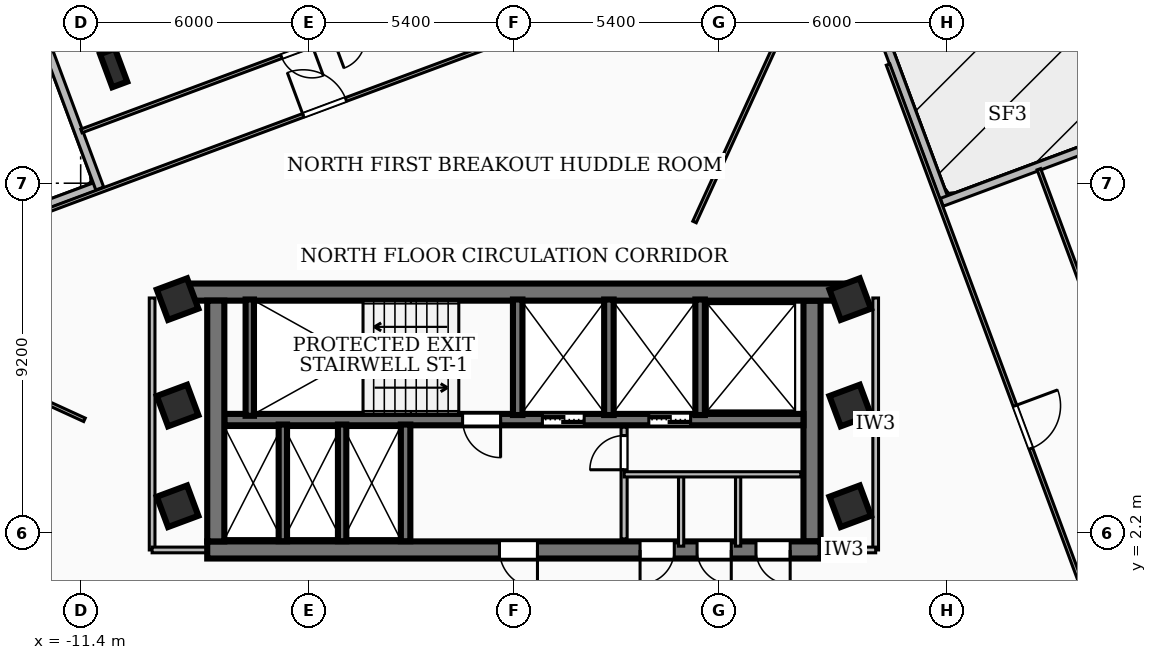
"""IFC4 building model, lengths in metres.
Left out: names, types, materials, properties, quantities, classifications, styles, units other than length and angle.
Written with IfcOpenShell. Run it as: python <this file> out.ifc"""

import sys

from ifc_helpers import new_model, si_unit, direction, frame, frame_2d, origin, origin_2d, place, context, subcontext, project, spatial, rectangle, i_section, extrude, element, fill, save


model = new_model("IFC4")
c1 = context("Model", 3, precision=1e-05, world=origin(), true_north=direction((0.0, 1.0)))
c2 = subcontext(c1, "Body", "Model", "MODEL_VIEW")
j1 = project(units=[si_unit("LENGTHUNIT", "METRE"), si_unit("PLANEANGLEUNIT", "RADIAN")], contexts=[c1])
p1 = place(None, origin())
s1 = spatial("IfcSite", under=j1, at=p1, CompositionType="ELEMENT")
p2 = place(p1, origin())
s2 = spatial("IfcBuilding", under=s1, at=p2, CompositionType="ELEMENT")
p3 = place(p2, frame((0.0, 0.0, 166.68)))
s3 = spatial("IfcBuildingStorey", under=s2, at=p3, CompositionType="ELEMENT", Elevation=166.68)
p4 = place(p3, frame((-8.78, 8.535, 0.0), z_axis=(0.0, 0.0, 1.0), x_axis=(1.0, 0.0, 0.0)))
e1 = element("IfcWall", 1, at=p4, inside=s3, PredefinedType="SHEAR", context=c2, shape_type="SweptSolid", body=[
    extrude(rectangle(XDim=17.56, YDim=0.45, at=frame_2d((8.78, 0.0))), origin(), (0.0, 0.0, 1.0), 3.34),
])
p5 = place(p3, frame((8.07, 1.75, 0.0), z_axis=(0.0, 0.0, 1.0), x_axis=(-1.0, 0.0, 0.0)))
e2 = element("IfcWall", 2, at=p5, inside=s3, PredefinedType="SHEAR", context=c2, shape_type="SweptSolid", body=[
    extrude(rectangle(XDim=16.14, YDim=0.45, at=frame_2d((8.07, 0.0))), origin(), (0.0, 0.0, 1.0), 3.34),
])
p6 = place(p5, frame((7.45, 0.0, 0.0)))
e3 = element("IfcOpeningElement", 3, at=p6, cuts=e2, PredefinedType="OPENING", context=c2, shape_type="SweptSolid", body=[
    extrude(rectangle(XDim=1.0, YDim=2.1, at=frame_2d((0.5, 1.05))), frame((0.0, 0.235, 0.0), z_axis=(0.0, -1.0, 0.0), x_axis=(1.0, 0.0, 0.0)), (0.0, 0.0, 1.0), 0.47),
])
p7 = place(p5, frame((3.85, 0.0, 0.0)))
e4 = element("IfcOpeningElement", 4, at=p7, cuts=e2, PredefinedType="OPENING", context=c2, shape_type="SweptSolid", body=[
    extrude(rectangle(XDim=0.9, YDim=2.06, at=frame_2d((0.45, 1.03))), frame((0.0, 0.235, 0.0), z_axis=(0.0, -1.0, 0.0), x_axis=(1.0, 0.0, 0.0)), (0.0, 0.0, 1.0), 0.47),
])
p8 = place(p5, frame((2.35, 0.0, 0.0)))
e5 = element("IfcOpeningElement", 5, at=p8, cuts=e2, PredefinedType="OPENING", context=c2, shape_type="SweptSolid", body=[
    extrude(rectangle(XDim=0.9, YDim=2.06, at=frame_2d((0.45, 1.03))), frame((0.0, 0.235, 0.0), z_axis=(0.0, -1.0, 0.0), x_axis=(1.0, 0.0, 0.0)), (0.0, 0.0, 1.0), 0.47),
])
p9 = place(p5, frame((0.8, 0.0, 0.0)))
e6 = element("IfcOpeningElement", 6, at=p9, cuts=e2, PredefinedType="OPENING", context=c2, shape_type="SweptSolid", body=[
    extrude(rectangle(XDim=0.9, YDim=2.06, at=frame_2d((0.45, 1.03))), frame((0.0, 0.235, 0.0), z_axis=(0.0, -1.0, 0.0), x_axis=(1.0, 0.0, 0.0)), (0.0, 0.0, 1.0), 0.47),
])
for number, where, z_axis, x_axis in (
    (7, (-7.845, 1.975, 0.0), (0.0, 0.0, 1.0), (0.0, 1.0, 0.0)),
    (8, (7.845, 8.31, 0.0), (0.0, 0.0, 1.0), (0.0, -1.0, 0.0)),
):
    element("IfcWall", number, at=place(p3, frame(where, z_axis=z_axis, x_axis=x_axis)), inside=s3, PredefinedType="SHEAR", context=c2, shape_type="SweptSolid", body=[
        extrude(rectangle(XDim=6.335, YDim=0.45, at=frame_2d((3.167, 0.0))), origin(), (0.0, 0.0, 1.0), 3.34),
    ])
p10 = place(p3, frame((7.62, 5.18, 0.0), z_axis=(0.0, 0.0, 1.0), x_axis=(-1.0, 0.0, 0.0)))
e9 = element("IfcWall", 9, at=p10, inside=s3, PredefinedType="SOLIDWALL", context=c2, shape_type="SweptSolid", body=[
    extrude(rectangle(XDim=15.24, YDim=0.3, at=frame_2d((7.62, 0.0))), origin(), (0.0, 0.0, 1.0), 3.34),
])
p11 = place(p10, frame((5.77, 0.0, 0.0)))
e10 = element("IfcOpeningElement", 10, at=p11, cuts=e9, PredefinedType="OPENING", context=c2, shape_type="SweptSolid", body=[
    extrude(rectangle(XDim=1.1, YDim=2.15, at=frame_2d((0.55, 1.075))), frame((0.0, 0.16, 0.0), z_axis=(0.0, -1.0, 0.0), x_axis=(1.0, 0.0, 0.0)), (0.0, 0.0, 1.0), 0.32),
])
p12 = place(p10, frame((2.97, 0.0, 0.0)))
e11 = element("IfcOpeningElement", 11, at=p12, cuts=e9, PredefinedType="OPENING", context=c2, shape_type="SweptSolid", body=[
    extrude(rectangle(XDim=1.1, YDim=2.15, at=frame_2d((0.55, 1.075))), frame((0.0, 0.16, 0.0), z_axis=(0.0, -1.0, 0.0), x_axis=(1.0, 0.0, 0.0)), (0.0, 0.0, 1.0), 0.32),
])
p13 = place(p10, frame((7.97, 0.0, 0.0)))
e12 = element("IfcOpeningElement", 12, at=p13, cuts=e9, PredefinedType="OPENING", context=c2, shape_type="SweptSolid", body=[
    extrude(rectangle(XDim=1.0, YDim=2.1, at=frame_2d((0.5, 1.05))), frame((0.0, 0.16, 0.0), z_axis=(0.0, -1.0, 0.0), x_axis=(1.0, 0.0, 0.0)), (0.0, 0.0, 1.0), 0.32),
])
p14 = place(p3, frame((-6.95, 5.28, 0.0), z_axis=(0.0, 0.0, 1.0), x_axis=(0.0, 1.0, 0.0)))
e13 = element("IfcWall", 13, at=p14, inside=s3, PredefinedType="SOLIDWALL", context=c2, shape_type="SweptSolid", body=[
    extrude(rectangle(XDim=3.06, YDim=0.22, at=frame_2d((1.53, 0.0))), origin(), (0.0, 0.0, 1.0), 3.34),
])
for number, where, z_axis, x_axis in (
    (14, (0.1, 5.3, 0.0), (0.0, 0.0, 1.0), (0.0, 1.0, 0.0)),
    (15, (2.5, 5.3, 0.0), (0.0, 0.0, 1.0), (0.0, 1.0, 0.0)),
    (16, (4.9, 5.3, 0.0), (0.0, 0.0, 1.0), (0.0, 1.0, 0.0)),
):
    element("IfcWall", number, at=place(p3, frame(where, z_axis=z_axis, x_axis=x_axis)), inside=s3, PredefinedType="SOLIDWALL", context=c2, shape_type="SweptSolid", body=[
        extrude(rectangle(XDim=3.04, YDim=0.25, at=frame_2d((1.52, 0.0))), origin(), (0.0, 0.0, 1.0), 3.34),
    ])
p15 = place(p3, frame((-2.85, 1.98, 0.0), z_axis=(0.0, 0.0, 1.0), x_axis=(0.0, 1.0, 0.0)))
e17 = element("IfcWall", 17, at=p15, inside=s3, PredefinedType="SOLIDWALL", context=c2, shape_type="SweptSolid", body=[
    extrude(rectangle(XDim=3.07, YDim=0.25, at=frame_2d((1.535, 0.0))), origin(), (0.0, 0.0, 1.0), 3.34),
])
for number, where, z_axis, x_axis in (
    (18, (-6.08, 1.98, 0.0), (0.0, 0.0, 1.0), (0.0, 1.0, 0.0)),
    (19, (-4.52, 1.98, 0.0), (0.0, 0.0, 1.0), (0.0, 1.0, 0.0)),
):
    element("IfcWall", number, at=place(p3, frame(where, z_axis=z_axis, x_axis=x_axis)), inside=s3, PredefinedType="SOLIDWALL", context=c2, shape_type="SweptSolid", body=[
        extrude(rectangle(XDim=3.07, YDim=0.22, at=frame_2d((1.535, 0.0))), origin(), (0.0, 0.0, 1.0), 3.34),
    ])
for number, where, z_axis, x_axis in (
    (20, (-8.85, 2.9, 0.0), (0.0, 0.0, 1.0), (0.937, 0.349, 0.0)),
    (21, (-8.85, 5.55, 0.0), (0.0, 0.0, 1.0), (0.937, 0.349, 0.0)),
    (22, (8.85, 2.9, 0.0), (0.0, 0.0, 1.0), (0.937, 0.349, 0.0)),
    (23, (8.85, 5.55, 0.0), (0.0, 0.0, 1.0), (0.937, 0.349, 0.0)),
    (24, (-8.85, 8.35, 0.0), (0.0, 0.0, 1.0), (0.937, 0.349, 0.0)),
    (25, (8.85, 8.35, 0.0), (0.0, 0.0, 1.0), (0.937, 0.349, 0.0)),
):
    element("IfcColumn", number, at=place(p3, frame(where, z_axis=z_axis, x_axis=x_axis)), inside=s3, PredefinedType="COLUMN", context=c2, shape_type="SweptSolid", body=[
        extrude(rectangle(XDim=0.85, YDim=0.85, at=origin_2d()), origin(), (0.0, 0.0, 1.0), 3.6),
    ])
p16 = place(p3, frame((-10.533, 14.433, 0.0), z_axis=(0.0, 0.0, 1.0), x_axis=(0.937281989492, 0.348572047322, 0.0)))
e26 = element("IfcColumn", 26, at=p16, inside=s3, PredefinedType="COLUMN", context=c2, shape_type="SweptSolid", body=[
    extrude(i_section(OverallWidth=0.418, OverallDepth=0.927, WebThickness=0.019, FlangeThickness=0.032, at=origin_2d()), origin(), (0.0, 0.0, 1.0), 3.6),
])
p17 = place(p3, frame((-17.181, 9.016, 0.0), z_axis=(0.0, 0.0, 1.0), x_axis=(0.937216908499, 0.34874699486, 0.0)))
e27 = element("IfcWall", 27, at=p17, inside=s3, PredefinedType="SOLIDWALL", context=c2, shape_type="SweptSolid", body=[
    extrude(rectangle(XDim=6.758, YDim=0.22, at=frame_2d((3.379, 0.0))), origin(), (0.0, 0.0, 1.0), 3.34),
])
p18 = place(p3, frame((-10.898, 11.26, 0.0), z_axis=(0.0, 0.0, 1.0), x_axis=(-0.348682373258, 0.937240952252, 0.0)))
e28 = element("IfcWall", 28, at=p18, inside=s3, PredefinedType="SOLIDWALL", context=c2, shape_type="SweptSolid", body=[
    extrude(rectangle(XDim=8.257, YDim=0.22, at=frame_2d((4.129, 0.0))), origin(), (0.0, 0.0, 1.0), 3.34),
])
p19 = place(p18, frame((5.357, 0.0, 0.85)))
e29 = element("IfcOpeningElement", 29, at=p19, cuts=e28, PredefinedType="OPENING", context=c2, shape_type="SweptSolid", body=[
    extrude(rectangle(XDim=1.8, YDim=1.8, at=frame_2d((0.9, 0.9))), frame((0.0, 0.12, 0.0), z_axis=(0.0, -1.0, 0.0), x_axis=(1.0, 0.0, 0.0)), (0.0, 0.0, 1.0), 0.24),
])
p20 = place(p3, frame((9.016, 17.181, 0.0), z_axis=(0.0, 0.0, 1.0), x_axis=(0.34874699486, -0.937216908499, 0.0)))
e30 = element("IfcWall", 30, at=p20, inside=s3, PredefinedType="SOLIDWALL", context=c2, shape_type="SweptSolid", body=[
    extrude(rectangle(XDim=6.758, YDim=0.22, at=frame_2d((3.379, 0.0))), origin(), (0.0, 0.0, 1.0), 2.644),
])
p21 = place(p3, frame((11.26, 10.898, 0.0), z_axis=(0.0, 0.0, 1.0), x_axis=(0.937247074189, 0.348665917354, 0.0)))
e31 = element("IfcWall", 31, at=p21, inside=s3, PredefinedType="SOLIDWALL", context=c2, shape_type="SweptSolid", body=[
    extrude(rectangle(XDim=9.858, YDim=0.22, at=frame_2d((4.929, 0.0))), origin(), (0.0, 0.0, 1.0), 2.644),
])
p22 = place(p21, frame((4.4, 0.0, 0.0)))
e32 = element("IfcOpeningElement", 32, at=p22, cuts=e31, PredefinedType="OPENING", context=c2, shape_type="SweptSolid", body=[
    extrude(rectangle(XDim=1.1, YDim=2.1, at=frame_2d((0.55, 1.05))), frame((0.0, 0.12, 0.0), z_axis=(0.0, -1.0, 0.0), x_axis=(1.0, 0.0, 0.0)), (0.0, 0.0, 1.0), 0.24),
])
p23 = place(p3, frame((2.9, 2.04, 0.0), z_axis=(0.0, 0.0, 1.0), x_axis=(0.0, 1.0, 0.0)))
e33 = element("IfcWall", 33, at=p23, inside=s3, PredefinedType="PARTITIONING", context=c2, shape_type="SweptSolid", body=[
    extrude(rectangle(XDim=2.94, YDim=0.16, at=frame_2d((1.47, 0.0))), origin(), (0.0, 0.0, 1.0), 2.57),
])
p24 = place(p23, frame((1.82, 0.0, 0.0)))
e34 = element("IfcOpeningElement", 34, at=p24, cuts=e33, PredefinedType="OPENING", context=c2, shape_type="SweptSolid", body=[
    extrude(rectangle(XDim=0.9, YDim=2.06, at=frame_2d((0.45, 1.03))), frame((0.0, 0.09, 0.0), z_axis=(0.0, -1.0, 0.0), x_axis=(1.0, 0.0, 0.0)), (0.0, 0.0, 1.0), 0.18),
])
p25 = place(p3, frame((2.9, 3.74, 0.0), z_axis=(0.0, 0.0, 1.0), x_axis=(1.0, 0.0, 0.0)))
e35 = element("IfcWall", 35, at=p25, inside=s3, PredefinedType="PARTITIONING", context=c2, shape_type="SweptSolid", body=[
    extrude(rectangle(XDim=4.65, YDim=0.138, at=frame_2d((2.325, 0.0))), origin(), (0.0, 0.0, 1.0), 3.34),
])
for number, where, z_axis, x_axis in (
    (36, (4.4, 1.85, 0.0), (0.0, 0.0, 1.0), (0.0, 1.0, 0.0)),
    (37, (5.9, 1.85, 0.0), (0.0, 0.0, 1.0), (0.0, 1.0, 0.0)),
):
    element("IfcWall", number, at=place(p3, frame(where, z_axis=z_axis, x_axis=x_axis)), inside=s3, PredefinedType="PARTITIONING", context=c2, shape_type="SweptSolid", body=[
        extrude(rectangle(XDim=1.89, YDim=0.138, at=frame_2d((0.945, 0.0))), origin(), (0.0, 0.0, 1.0), 2.57),
    ])
p26 = place(p3, frame((-9.52, 1.75, 0.0), z_axis=(0.0, 0.0, 1.0), x_axis=(0.0, 1.0, 0.0)))
e38 = element("IfcWall", 38, at=p26, inside=s3, PredefinedType="PARTITIONING", context=c2, shape_type="SweptSolid", body=[
    extrude(rectangle(XDim=6.63, YDim=0.15, at=frame_2d((3.315, 0.0))), origin(), (0.0, 0.0, 1.0), 3.34),
])
p27 = place(p3, frame((-7.85, 1.75, 0.0), z_axis=(0.0, 0.0, 1.0), x_axis=(-1.0, 0.0, 0.0)))
e39 = element("IfcWall", 39, at=p27, inside=s3, PredefinedType="PARTITIONING", context=c2, shape_type="SweptSolid", body=[
    extrude(rectangle(XDim=1.67, YDim=0.15, at=frame_2d((0.835, 0.0))), origin(), (0.0, 0.0, 1.0), 2.57),
])
p28 = place(p3, frame((9.52, 1.75, 0.0), z_axis=(0.0, 0.0, 1.0), x_axis=(0.0, 1.0, 0.0)))
e40 = element("IfcWall", 40, at=p28, inside=s3, PredefinedType="PARTITIONING", context=c2, shape_type="SweptSolid", body=[
    extrude(rectangle(XDim=6.63, YDim=0.15, at=frame_2d((3.315, 0.0))), origin(), (0.0, 0.0, 1.0), 2.644),
])
p29 = place(p3, frame((7.85, 1.75, 0.0), z_axis=(0.0, 0.0, 1.0), x_axis=(1.0, 0.0, 0.0)))
e41 = element("IfcWall", 41, at=p29, inside=s3, PredefinedType="PARTITIONING", context=c2, shape_type="SweptSolid", body=[
    extrude(rectangle(XDim=1.67, YDim=0.15, at=frame_2d((0.835, 0.0))), origin(), (0.0, 0.0, 1.0), 2.57),
])
p30 = place(p3, frame((4.753, 10.38, 0.0), z_axis=(0.0, 0.0, 1.0), x_axis=(0.416191484634, 0.909276991966, 0.0)))
e42 = element("IfcWall", 42, at=p30, inside=s3, PredefinedType="PARTITIONING", context=c2, shape_type="SweptSolid", body=[
    extrude(rectangle(XDim=8.258, YDim=0.1, at=frame_2d((4.129, 0.0))), origin(), (0.0, 0.0, 1.0), 2.644),
])
p31 = place(p3, frame((-11.3, 5.174, 0.0), z_axis=(0.0, 0.0, 1.0), x_axis=(-0.909275268701, 0.416195249528, 0.0)))
e43 = element("IfcWall", 43, at=p31, inside=s3, PredefinedType="PARTITIONING", context=c2, shape_type="SweptSolid", body=[
    extrude(rectangle(XDim=7.246, YDim=0.1, at=frame_2d((3.623, 0.0))), origin(), (0.0, 0.0, 1.0), 3.34),
])
p32 = place(p3, frame((9.846, 14.522, 0.0), z_axis=(0.0, 0.0, 1.0), x_axis=(0.348543090668, -0.937292757866, 0.0)))
e44 = element("IfcWall", 44, at=p32, inside=s3, PredefinedType="PARTITIONING", context=c2, shape_type="SweptSolid", body=[
    extrude(rectangle(XDim=20.198, YDim=0.1, at=frame_2d((10.099, 0.0))), origin(), (0.0, 0.0, 1.0), 2.644),
])
p33 = place(p32, frame((9.579, 0.0, 0.0)))
e45 = element("IfcOpeningElement", 45, at=p33, cuts=e44, PredefinedType="OPENING", context=c2, shape_type="SweptSolid", body=[
    extrude(rectangle(XDim=1.2, YDim=2.1, at=frame_2d((0.6, 1.05))), frame((0.0, 0.06, 0.0), z_axis=(0.0, -1.0, 0.0), x_axis=(1.0, 0.0, 0.0)), (0.0, 0.0, 1.0), 0.12),
])
p34 = place(p3, frame((13.814, 11.768, 0.0), z_axis=(0.0, 0.0, 1.0), x_axis=(0.348608135993, -0.937268567445, 0.0)))
e46 = element("IfcWall", 46, at=p34, inside=s3, PredefinedType="PARTITIONING", context=c2, shape_type="SweptSolid", body=[
    extrude(rectangle(XDim=12.59, YDim=0.1, at=frame_2d((6.295, 0.0))), origin(), (0.0, 0.0, 1.0), 2.644),
])
p35 = place(p34, frame((5.69, 0.0, 0.0)))
e47 = element("IfcOpeningElement", 47, at=p35, cuts=e46, PredefinedType="OPENING", context=c2, shape_type="SweptSolid", body=[
    extrude(rectangle(XDim=1.05, YDim=2.08, at=frame_2d((0.525, 1.04))), frame((0.0, 0.06, 0.0), z_axis=(0.0, -1.0, 0.0), x_axis=(1.0, 0.0, 0.0)), (0.0, 0.0, 1.0), 0.12),
])
p36 = place(p3, frame((-14.522, 9.846, 0.0), z_axis=(0.0, 0.0, 1.0), x_axis=(0.937292757866, 0.348543090668, 0.0)))
e48 = element("IfcWall", 48, at=p36, inside=s3, PredefinedType="PARTITIONING", context=c2, shape_type="SweptSolid", body=[
    extrude(rectangle(XDim=20.198, YDim=0.1, at=frame_2d((10.099, 0.0))), origin(), (0.0, 0.0, 1.0), 2.644),
])
p37 = place(p36, frame((9.579, 0.0, 0.0)))
e49 = element("IfcOpeningElement", 49, at=p37, cuts=e48, PredefinedType="OPENING", context=c2, shape_type="SweptSolid", body=[
    extrude(rectangle(XDim=1.2, YDim=2.1, at=frame_2d((0.6, 1.05))), frame((0.0, 0.06, 0.0), z_axis=(0.0, -1.0, 0.0), x_axis=(1.0, 0.0, 0.0)), (0.0, 0.0, 1.0), 0.12),
])
p38 = place(p3, frame((0.419, 17.163, 0.0), z_axis=(0.0, 0.0, 1.0), x_axis=(-0.937262231235, -0.348625171066, 0.0)))
e50 = element("IfcWall", 50, at=p38, inside=s3, PredefinedType="PARTITIONING", context=c2, shape_type="SweptSolid", body=[
    extrude(rectangle(XDim=12.59, YDim=0.1, at=frame_2d((6.295, 0.0))), origin(), (0.0, 0.0, 1.0), 2.644),
])
p39 = place(p38, frame((4.675, 0.0, 0.0)))
e51 = element("IfcOpeningElement", 51, at=p39, cuts=e50, PredefinedType="OPENING", context=c2, shape_type="SweptSolid", body=[
    extrude(rectangle(XDim=0.86, YDim=2.04, at=frame_2d((0.43, 1.02))), frame((0.0, 0.06, 0.0), z_axis=(0.0, -1.0, 0.0), x_axis=(1.0, 0.0, 0.0)), (0.0, 0.0, 1.0), 0.12),
])
p40 = place(p38, frame((6.115, 0.0, 0.0)))
e52 = element("IfcOpeningElement", 52, at=p40, cuts=e50, PredefinedType="OPENING", context=c2, shape_type="SweptSolid", body=[
    extrude(rectangle(XDim=0.86, YDim=2.04, at=frame_2d((0.43, 1.02))), frame((0.0, 0.06, 0.0), z_axis=(0.0, -1.0, 0.0), x_axis=(1.0, 0.0, 0.0)), (0.0, 0.0, 1.0), 0.12),
])
p41 = place(p3, frame((-9.846, -14.522, 0.0), z_axis=(0.0, 0.0, 1.0), x_axis=(-0.348543090668, 0.937292757866, 0.0)))
e53 = element("IfcWall", 53, at=p41, inside=s3, PredefinedType="PARTITIONING", context=c2, shape_type="SweptSolid", body=[
    extrude(rectangle(XDim=20.198, YDim=0.1, at=frame_2d((10.099, 0.0))), origin(), (0.0, 0.0, 1.0), 2.644),
])
p42 = place(p41, frame((9.579, 0.0, 0.0)))
e54 = element("IfcOpeningElement", 54, at=p42, cuts=e53, PredefinedType="OPENING", context=c2, shape_type="SweptSolid", body=[
    extrude(rectangle(XDim=1.2, YDim=2.1, at=frame_2d((0.6, 1.05))), frame((0.0, 0.06, 0.0), z_axis=(0.0, -1.0, 0.0), x_axis=(1.0, 0.0, 0.0)), (0.0, 0.0, 1.0), 0.12),
])
p43 = place(p6, origin())
e55 = element("IfcDoor", 55, at=p43, inside=s3, OperationType="SINGLE_SWING_LEFT", PredefinedType="DOOR", context=c2, shape_type="SweptSolid", body=[
    extrude(rectangle(XDim=1.0, YDim=2.1, at=frame_2d((0.5, 1.05))), frame((0.0, 0.025, 0.0), z_axis=(0.0, -1.0, 0.0), x_axis=(1.0, 0.0, 0.0)), (0.0, 0.0, 1.0), 0.05),
])
fill(e3, e55)
p44 = place(p11, origin())
e56 = element("IfcDoor", 56, at=p44, inside=s3, OperationType="DOUBLE_DOOR_SLIDING", PredefinedType="DOOR", context=c2, shape_type="SweptSolid", body=[
    extrude(rectangle(XDim=1.1, YDim=2.15, at=frame_2d((0.55, 1.075))), frame((0.0, 0.025, 0.0), z_axis=(0.0, -1.0, 0.0), x_axis=(1.0, 0.0, 0.0)), (0.0, 0.0, 1.0), 0.05),
])
fill(e10, e56)
p45 = place(p12, origin())
e57 = element("IfcDoor", 57, at=p45, inside=s3, OperationType="DOUBLE_DOOR_SLIDING", PredefinedType="DOOR", context=c2, shape_type="SweptSolid", body=[
    extrude(rectangle(XDim=1.1, YDim=2.15, at=frame_2d((0.55, 1.075))), frame((0.0, 0.025, 0.0), z_axis=(0.0, -1.0, 0.0), x_axis=(1.0, 0.0, 0.0)), (0.0, 0.0, 1.0), 0.05),
])
fill(e11, e57)
p46 = place(p13, origin())
e58 = element("IfcDoor", 58, at=p46, inside=s3, OperationType="SINGLE_SWING_LEFT", PredefinedType="DOOR", context=c2, shape_type="SweptSolid", body=[
    extrude(rectangle(XDim=1.0, YDim=2.1, at=frame_2d((0.5, 1.05))), frame((0.0, 0.025, 0.0), z_axis=(0.0, -1.0, 0.0), x_axis=(1.0, 0.0, 0.0)), (0.0, 0.0, 1.0), 0.05),
])
fill(e12, e58)
p47 = place(p7, origin())
e59 = element("IfcDoor", 59, at=p47, inside=s3, OperationType="SINGLE_SWING_RIGHT", PredefinedType="DOOR", context=c2, shape_type="SweptSolid", body=[
    extrude(rectangle(XDim=0.9, YDim=2.06, at=frame_2d((0.45, 1.03))), frame((0.0, 0.025, 0.0), z_axis=(0.0, -1.0, 0.0), x_axis=(1.0, 0.0, 0.0)), (0.0, 0.0, 1.0), 0.05),
])
fill(e4, e59)
p48 = place(p8, origin())
e60 = element("IfcDoor", 60, at=p48, inside=s3, OperationType="SINGLE_SWING_LEFT", PredefinedType="DOOR", context=c2, shape_type="SweptSolid", body=[
    extrude(rectangle(XDim=0.9, YDim=2.06, at=frame_2d((0.45, 1.03))), frame((0.0, 0.025, 0.0), z_axis=(0.0, -1.0, 0.0), x_axis=(1.0, 0.0, 0.0)), (0.0, 0.0, 1.0), 0.05),
])
fill(e5, e60)
p49 = place(p9, origin())
e61 = element("IfcDoor", 61, at=p49, inside=s3, OperationType="SINGLE_SWING_LEFT", PredefinedType="DOOR", context=c2, shape_type="SweptSolid", body=[
    extrude(rectangle(XDim=0.9, YDim=2.06, at=frame_2d((0.45, 1.03))), frame((0.0, 0.025, 0.0), z_axis=(0.0, -1.0, 0.0), x_axis=(1.0, 0.0, 0.0)), (0.0, 0.0, 1.0), 0.05),
])
fill(e6, e61)
p50 = place(p24, origin())
e62 = element("IfcDoor", 62, at=p50, inside=s3, OperationType="SINGLE_SWING_LEFT", PredefinedType="DOOR", context=c2, shape_type="SweptSolid", body=[
    extrude(rectangle(XDim=0.9, YDim=2.06, at=frame_2d((0.45, 1.03))), frame((0.0, 0.025, 0.0), z_axis=(0.0, -1.0, 0.0), x_axis=(1.0, 0.0, 0.0)), (0.0, 0.0, 1.0), 0.05),
])
fill(e34, e62)
p51 = place(p33, origin())
e63 = element("IfcDoor", 63, at=p51, inside=s3, OperationType="SINGLE_SWING_LEFT", PredefinedType="DOOR", context=c2, shape_type="SweptSolid", body=[
    extrude(rectangle(XDim=1.2, YDim=2.1, at=frame_2d((0.6, 1.05))), frame((0.0, 0.025, 0.0), z_axis=(0.0, -1.0, 0.0), x_axis=(1.0, 0.0, 0.0)), (0.0, 0.0, 1.0), 0.05),
])
fill(e45, e63)
p52 = place(p37, origin())
e64 = element("IfcDoor", 64, at=p52, inside=s3, OperationType="SINGLE_SWING_LEFT", PredefinedType="DOOR", context=c2, shape_type="SweptSolid", body=[
    extrude(rectangle(XDim=1.2, YDim=2.1, at=frame_2d((0.6, 1.05))), frame((0.0, 0.025, 0.0), z_axis=(0.0, -1.0, 0.0), x_axis=(1.0, 0.0, 0.0)), (0.0, 0.0, 1.0), 0.05),
])
fill(e49, e64)
p53 = place(p40, origin())
e65 = element("IfcDoor", 65, at=p53, inside=s3, OperationType="SINGLE_SWING_LEFT", PredefinedType="DOOR", context=c2, shape_type="SweptSolid", body=[
    extrude(rectangle(XDim=0.86, YDim=2.04, at=frame_2d((0.43, 1.02))), frame((0.0, 0.025, 0.0), z_axis=(0.0, -1.0, 0.0), x_axis=(1.0, 0.0, 0.0)), (0.0, 0.0, 1.0), 0.05),
])
fill(e52, e65)
save(model, sys.argv[1])
